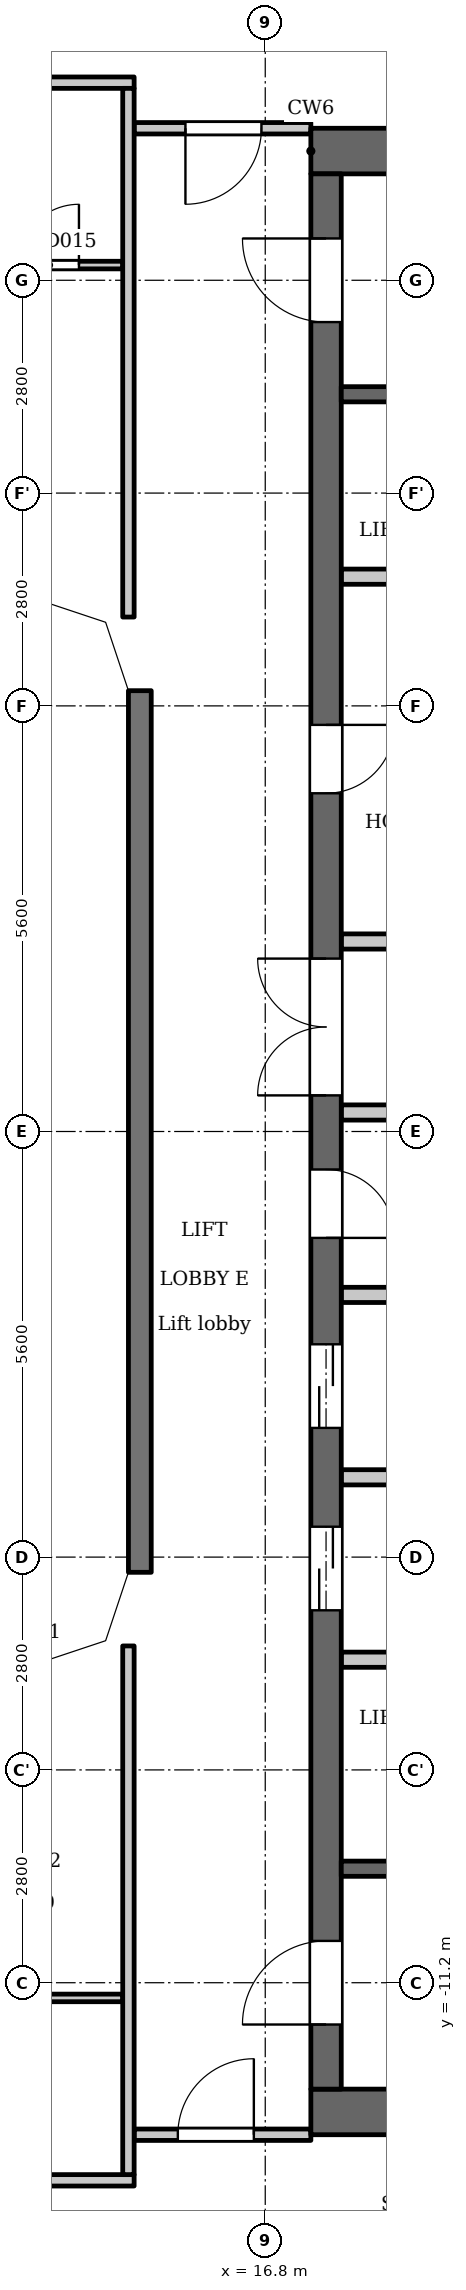
"""IFC4 building model, lengths in metres.
Left out: names, types, materials, properties, quantities, classifications, styles, units other than length and angle.
Written with IfcOpenShell. Run it as: python <this file> out.ifc"""

import sys

from ifc_helpers import new_model, si_unit, direction, frame, frame_2d, origin, place, context, subcontext, project, spatial, polyline, rectangle, outline, extrude, element, fill, save


model = new_model("IFC4")
c1 = context("Model", 3, precision=1e-05, world=origin(), true_north=direction((0.0, 1.0)))
c2 = subcontext(c1, "Body", "Model", "MODEL_VIEW")
j1 = project(units=[si_unit("LENGTHUNIT", "METRE"), si_unit("PLANEANGLEUNIT", "RADIAN")], contexts=[c1])
p1 = place(None, origin())
s1 = spatial("IfcSite", under=j1, at=p1, CompositionType="ELEMENT")
p2 = place(p1, origin())
s2 = spatial("IfcBuilding", under=s1, at=p2, CompositionType="ELEMENT")
p3 = place(p2, frame((0.0, 0.0, 273.2)))
s3 = spatial("IfcBuildingStorey", under=s2, at=p3, CompositionType="ELEMENT", Elevation=273.2)
p4 = place(p3, frame((15.15, 5.8, 0.0), z_axis=(0.0, 0.0, 1.0), x_axis=(0.0, -1.0, 0.0)))
e1 = element("IfcWall", 1, at=p4, inside=s3, PredefinedType="SOLIDWALL", context=c2, shape_type="SweptSolid", body=[
    extrude(rectangle(XDim=11.6, YDim=0.3, at=frame_2d((5.8, 0.0))), origin(), (0.0, 0.0, 1.0), 3.2),
])
for number, where, z_axis, x_axis in (
    (2, (17.4, 12.9, 0.0), (0.0, 0.0, 1.0), (1.0, 0.0, 0.0)),
    (3, (17.4, -12.9, 0.0), (0.0, 0.0, 1.0), (1.0, 0.0, 0.0)),
):
    element("IfcWall", number, at=place(p3, frame(where, z_axis=z_axis, x_axis=x_axis)), inside=s3, PredefinedType="SHEAR", context=c2, shape_type="SweptSolid", body=[
        extrude(rectangle(XDim=7.32, YDim=0.6, at=frame_2d((3.66, 0.0))), origin(), (0.0, 0.0, 1.0), 3.2),
    ])
p5 = place(p3, frame((17.6, -12.6, 0.0), z_axis=(0.0, 0.0, 1.0), x_axis=(0.0, 1.0, 0.0)))
e4 = element("IfcWall", 4, at=p5, inside=s3, PredefinedType="SHEAR", context=c2, shape_type="SweptSolid", body=[
    extrude(rectangle(XDim=25.2, YDim=0.4, at=frame_2d((12.6, 0.0))), origin(), (0.0, 0.0, 1.0), 3.2),
])
p6 = place(p5, frame((6.3, 0.0, 0.0)))
e5 = element("IfcOpeningElement", 5, at=p6, cuts=e4, PredefinedType="OPENING", context=c2, shape_type="SweptSolid", body=[
    extrude(rectangle(XDim=1.1, YDim=2.1, at=frame_2d((0.55, 1.05))), frame((0.0, 0.21, 0.0), z_axis=(0.0, -1.0, 0.0), x_axis=(1.0, 0.0, 0.0)), (0.0, 0.0, 1.0), 0.42),
])
p7 = place(p5, frame((8.7, 0.0, 0.0)))
e6 = element("IfcOpeningElement", 6, at=p7, cuts=e4, PredefinedType="OPENING", context=c2, shape_type="SweptSolid", body=[
    extrude(rectangle(XDim=1.1, YDim=2.1, at=frame_2d((0.55, 1.05))), frame((0.0, 0.21, 0.0), z_axis=(0.0, -1.0, 0.0), x_axis=(1.0, 0.0, 0.0)), (0.0, 0.0, 1.0), 0.42),
])
p8 = place(p5, frame((11.2, 0.0, 0.0)))
e7 = element("IfcOpeningElement", 7, at=p8, cuts=e4, PredefinedType="OPENING", context=c2, shape_type="SweptSolid", body=[
    extrude(rectangle(XDim=0.9, YDim=2.1, at=frame_2d((0.45, 1.05))), frame((0.0, 0.21, 0.0), z_axis=(0.0, -1.0, 0.0), x_axis=(1.0, 0.0, 0.0)), (0.0, 0.0, 1.0), 0.42),
])
p9 = place(p5, frame((17.05, 0.0, 0.0)))
e8 = element("IfcOpeningElement", 8, at=p9, cuts=e4, PredefinedType="OPENING", context=c2, shape_type="SweptSolid", body=[
    extrude(rectangle(XDim=0.9, YDim=2.1, at=frame_2d((0.45, 1.05))), frame((0.0, 0.21, 0.0), z_axis=(0.0, -1.0, 0.0), x_axis=(1.0, 0.0, 0.0)), (0.0, 0.0, 1.0), 0.42),
])
p10 = place(p5, frame((23.25, 0.0, 0.0)))
e9 = element("IfcOpeningElement", 9, at=p10, cuts=e4, PredefinedType="OPENING", context=c2, shape_type="SweptSolid", body=[
    extrude(rectangle(XDim=1.1, YDim=2.1, at=frame_2d((0.55, 1.05))), frame((0.0, 0.21, 0.0), z_axis=(0.0, -1.0, 0.0), x_axis=(1.0, 0.0, 0.0)), (0.0, 0.0, 1.0), 0.42),
])
p11 = place(p5, frame((0.85, 0.0, 0.0)))
e10 = element("IfcOpeningElement", 10, at=p11, cuts=e4, PredefinedType="OPENING", context=c2, shape_type="SweptSolid", body=[
    extrude(rectangle(XDim=1.1, YDim=2.1, at=frame_2d((0.55, 1.05))), frame((0.0, 0.21, 0.0), z_axis=(0.0, -1.0, 0.0), x_axis=(1.0, 0.0, 0.0)), (0.0, 0.0, 1.0), 0.42),
])
p12 = place(p5, frame((13.075, 0.0, 0.0)))
e11 = element("IfcOpeningElement", 11, at=p12, cuts=e4, PredefinedType="OPENING", context=c2, shape_type="SweptSolid", body=[
    extrude(rectangle(XDim=1.8, YDim=2.1, at=frame_2d((0.9, 1.05))), frame((0.0, 0.21, 0.0), z_axis=(0.0, -1.0, 0.0), x_axis=(1.0, 0.0, 0.0)), (0.0, 0.0, 1.0), 0.42),
])
p13 = place(p3, frame((17.8, -9.7, 0.0), z_axis=(0.0, 0.0, 1.0), x_axis=(1.0, 0.0, 0.0)))
e12 = element("IfcWall", 12, at=p13, inside=s3, PredefinedType="SHEAR", context=c2, shape_type="SweptSolid", body=[
    extrude(rectangle(XDim=5.8, YDim=0.2, at=frame_2d((2.9, 0.0))), origin(), (0.0, 0.0, 1.0), 3.2),
])
p14 = place(p13, frame((0.85, 0.0, 0.0)))
e13 = element("IfcOpeningElement", 13, at=p14, cuts=e12, PredefinedType="OPENING", context=c2, shape_type="SweptSolid", body=[
    extrude(rectangle(XDim=1.1, YDim=2.1, at=frame_2d((0.55, 1.05))), frame((0.0, 0.11, 0.0), z_axis=(0.0, -1.0, 0.0), x_axis=(1.0, 0.0, 0.0)), (0.0, 0.0, 1.0), 0.22),
])
p15 = place(p13, frame((3.75, 0.0, 0.0)))
e14 = element("IfcOpeningElement", 14, at=p15, cuts=e12, PredefinedType="OPENING", context=c2, shape_type="SweptSolid", body=[
    extrude(rectangle(XDim=1.1, YDim=2.1, at=frame_2d((0.55, 1.05))), frame((0.0, 0.11, 0.0), z_axis=(0.0, -1.0, 0.0), x_axis=(1.0, 0.0, 0.0)), (0.0, 0.0, 1.0), 0.22),
])
for number, where, z_axis, x_axis in (
    (15, (17.8, -6.95, 0.0), (0.0, 0.0, 1.0), (1.0, 0.0, 0.0)),
    (16, (17.8, -4.55, 0.0), (0.0, 0.0, 1.0), (1.0, 0.0, 0.0)),
    (17, (17.8, -2.15, 0.0), (0.0, 0.0, 1.0), (1.0, 0.0, 0.0)),
):
    element("IfcWall", number, at=place(p3, frame(where, z_axis=z_axis, x_axis=x_axis)), inside=s3, PredefinedType="PARTITIONING", context=c2, shape_type="SweptSolid", body=[
        extrude(rectangle(XDim=2.8, YDim=0.2, at=frame_2d((1.4, 0.0))), origin(), (0.0, 0.0, 1.0), 3.2),
    ])
for number, where, z_axis, x_axis in (
    (18, (17.8, 0.25, 0.0), (0.0, 0.0, 1.0), (1.0, 0.0, 0.0)),
    (19, (17.8, 2.5, 0.0), (0.0, 0.0, 1.0), (1.0, 0.0, 0.0)),
):
    element("IfcWall", number, at=place(p3, frame(where, z_axis=z_axis, x_axis=x_axis)), inside=s3, PredefinedType="PARTITIONING", context=c2, shape_type="SweptSolid", body=[
        extrude(rectangle(XDim=3.0, YDim=0.2, at=frame_2d((1.5, 0.0))), origin(), (0.0, 0.0, 1.0), 3.2),
    ])
p16 = place(p3, frame((17.8, 7.3, 0.0), z_axis=(0.0, 0.0, 1.0), x_axis=(1.0, 0.0, 0.0)))
e20 = element("IfcWall", 20, at=p16, inside=s3, PredefinedType="PARTITIONING", context=c2, shape_type="SweptSolid", body=[
    extrude(rectangle(XDim=2.8, YDim=0.2, at=frame_2d((1.4, 0.0))), origin(), (0.0, 0.0, 1.0), 3.2),
])
p17 = place(p3, frame((17.8, 9.7, 0.0), z_axis=(0.0, 0.0, 1.0), x_axis=(1.0, 0.0, 0.0)))
e21 = element("IfcWall", 21, at=p17, inside=s3, PredefinedType="SHEAR", context=c2, shape_type="SweptSolid", body=[
    extrude(rectangle(XDim=5.8, YDim=0.2, at=frame_2d((2.9, 0.0))), origin(), (0.0, 0.0, 1.0), 3.2),
])
p18 = place(p17, frame((0.85, 0.0, 0.0)))
e22 = element("IfcOpeningElement", 22, at=p18, cuts=e21, PredefinedType="OPENING", context=c2, shape_type="SweptSolid", body=[
    extrude(rectangle(XDim=1.1, YDim=2.1, at=frame_2d((0.55, 1.05))), frame((0.0, 0.11, 0.0), z_axis=(0.0, -1.0, 0.0), x_axis=(1.0, 0.0, 0.0)), (0.0, 0.0, 1.0), 0.22),
])
p19 = place(p17, frame((3.75, 0.0, 0.0)))
e23 = element("IfcOpeningElement", 23, at=p19, cuts=e21, PredefinedType="OPENING", context=c2, shape_type="SweptSolid", body=[
    extrude(rectangle(XDim=1.1, YDim=2.1, at=frame_2d((0.55, 1.05))), frame((0.0, 0.11, 0.0), z_axis=(0.0, -1.0, 0.0), x_axis=(1.0, 0.0, 0.0)), (0.0, 0.0, 1.0), 0.22),
])
p20 = place(p3, frame((-15.075, -13.8, 0.0), z_axis=(0.0, 0.0, 1.0), x_axis=(1.0, 0.0, 0.0)))
e24 = element("IfcWall", 24, at=p20, inside=s3, PredefinedType="PARTITIONING", context=c2, shape_type="SweptSolid", body=[
    extrude(rectangle(XDim=30.15, YDim=0.15, at=frame_2d((15.075, 0.0))), origin(), (0.0, 0.0, 1.0), 3.2),
])
p21 = place(p20, frame((10.175, 0.0, 0.0)))
e25 = element("IfcOpeningElement", 25, at=p21, cuts=e24, PredefinedType="OPENING", context=c2, shape_type="SweptSolid", body=[
    extrude(rectangle(XDim=1.0, YDim=2.1, at=frame_2d((0.5, 1.05))), frame((0.0, 0.085, 0.0), z_axis=(0.0, -1.0, 0.0), x_axis=(1.0, 0.0, 0.0)), (0.0, 0.0, 1.0), 0.17),
])
p22 = place(p20, frame((15.775, 0.0, 0.0)))
e26 = element("IfcOpeningElement", 26, at=p22, cuts=e24, PredefinedType="OPENING", context=c2, shape_type="SweptSolid", body=[
    extrude(rectangle(XDim=1.0, YDim=2.1, at=frame_2d((0.5, 1.05))), frame((0.0, 0.085, 0.0), z_axis=(0.0, -1.0, 0.0), x_axis=(1.0, 0.0, 0.0)), (0.0, 0.0, 1.0), 0.17),
])
p23 = place(p3, frame((15.075, -13.2, 0.0), z_axis=(0.0, 0.0, 1.0), x_axis=(1.0, 0.0, 0.0)))
e27 = element("IfcWall", 27, at=p23, inside=s3, PredefinedType="PARTITIONING", context=c2, shape_type="SweptSolid", body=[
    extrude(rectangle(XDim=2.325, YDim=0.15, at=frame_2d((1.163, 0.0))), origin(), (0.0, 0.0, 1.0), 3.2),
])
p24 = place(p23, frame((0.575, 0.0, 0.0)))
e28 = element("IfcOpeningElement", 28, at=p24, cuts=e27, PredefinedType="OPENING", context=c2, shape_type="SweptSolid", body=[
    extrude(rectangle(XDim=1.0, YDim=2.1, at=frame_2d((0.5, 1.05))), frame((0.0, 0.085, 0.0), z_axis=(0.0, -1.0, 0.0), x_axis=(1.0, 0.0, 0.0)), (0.0, 0.0, 1.0), 0.17),
])
p25 = place(p3, frame((-14.925, -11.4, 0.0), z_axis=(0.0, 0.0, 1.0), x_axis=(1.0, 0.0, 0.0)))
e29 = element("IfcWall", 29, at=p25, inside=s3, PredefinedType="PARTITIONING", context=c2, shape_type="SweptSolid", body=[
    extrude(rectangle(XDim=29.85, YDim=0.1, at=frame_2d((14.925, 0.0))), origin(), (0.0, 0.0, 1.0), 3.2),
])
p26 = place(p25, frame((13.375, 0.0, 0.0)))
e30 = element("IfcOpeningElement", 30, at=p26, cuts=e29, PredefinedType="OPENING", context=c2, shape_type="SweptSolid", body=[
    extrude(rectangle(XDim=0.9, YDim=2.1, at=frame_2d((0.45, 1.05))), frame((0.0, 0.06, 0.0), z_axis=(0.0, -1.0, 0.0), x_axis=(1.0, 0.0, 0.0)), (0.0, 0.0, 1.0), 0.12),
])
p27 = place(p25, frame((4.775, 0.0, 0.0)))
e31 = element("IfcOpeningElement", 31, at=p27, cuts=e29, PredefinedType="OPENING", context=c2, shape_type="SweptSolid", body=[
    extrude(rectangle(XDim=0.9, YDim=2.1, at=frame_2d((0.45, 1.05))), frame((0.0, 0.06, 0.0), z_axis=(0.0, -1.0, 0.0), x_axis=(1.0, 0.0, 0.0)), (0.0, 0.0, 1.0), 0.12),
])
p28 = place(p25, frame((18.475, 0.0, 0.0)))
e32 = element("IfcOpeningElement", 32, at=p28, cuts=e29, PredefinedType="OPENING", context=c2, shape_type="SweptSolid", body=[
    extrude(rectangle(XDim=0.9, YDim=2.1, at=frame_2d((0.45, 1.05))), frame((0.0, 0.06, 0.0), z_axis=(0.0, -1.0, 0.0), x_axis=(1.0, 0.0, 0.0)), (0.0, 0.0, 1.0), 0.12),
])
p29 = place(p25, frame((21.825, 0.0, 0.0)))
e33 = element("IfcOpeningElement", 33, at=p29, cuts=e29, PredefinedType="OPENING", context=c2, shape_type="SweptSolid", body=[
    extrude(rectangle(XDim=0.9, YDim=2.1, at=frame_2d((0.45, 1.05))), frame((0.0, 0.06, 0.0), z_axis=(0.0, -1.0, 0.0), x_axis=(1.0, 0.0, 0.0)), (0.0, 0.0, 1.0), 0.12),
])
p30 = place(p3, frame((-14.925, 11.4, 0.0), z_axis=(0.0, 0.0, 1.0), x_axis=(1.0, 0.0, 0.0)))
e34 = element("IfcWall", 34, at=p30, inside=s3, PredefinedType="PARTITIONING", context=c2, shape_type="SweptSolid", body=[
    extrude(rectangle(XDim=29.85, YDim=0.1, at=frame_2d((14.925, 0.0))), origin(), (0.0, 0.0, 1.0), 3.2),
])
p31 = place(p30, frame((13.475, 0.0, 0.0)))
e35 = element("IfcOpeningElement", 35, at=p31, cuts=e34, PredefinedType="OPENING", context=c2, shape_type="SweptSolid", body=[
    extrude(rectangle(XDim=0.9, YDim=2.1, at=frame_2d((0.45, 1.05))), frame((0.0, 0.06, 0.0), z_axis=(0.0, -1.0, 0.0), x_axis=(1.0, 0.0, 0.0)), (0.0, 0.0, 1.0), 0.12),
])
p32 = place(p30, frame((4.625, 0.0, 0.0)))
e36 = element("IfcOpeningElement", 36, at=p32, cuts=e34, PredefinedType="OPENING", context=c2, shape_type="SweptSolid", body=[
    extrude(rectangle(XDim=0.9, YDim=2.1, at=frame_2d((0.45, 1.05))), frame((0.0, 0.06, 0.0), z_axis=(0.0, -1.0, 0.0), x_axis=(1.0, 0.0, 0.0)), (0.0, 0.0, 1.0), 0.12),
])
p33 = place(p30, frame((18.075, 0.0, 0.0)))
e37 = element("IfcOpeningElement", 37, at=p33, cuts=e34, PredefinedType="OPENING", context=c2, shape_type="SweptSolid", body=[
    extrude(rectangle(XDim=0.8, YDim=2.1, at=frame_2d((0.4, 1.05))), frame((0.0, 0.06, 0.0), z_axis=(0.0, -1.0, 0.0), x_axis=(1.0, 0.0, 0.0)), (0.0, 0.0, 1.0), 0.12),
])
p34 = place(p30, frame((15.575, 0.0, 0.0)))
e38 = element("IfcOpeningElement", 38, at=p34, cuts=e34, PredefinedType="OPENING", context=c2, shape_type="SweptSolid", body=[
    extrude(rectangle(XDim=0.9, YDim=2.1, at=frame_2d((0.45, 1.05))), frame((0.0, 0.06, 0.0), z_axis=(0.0, -1.0, 0.0), x_axis=(1.0, 0.0, 0.0)), (0.0, 0.0, 1.0), 0.12),
])
p35 = place(p30, frame((28.474, 0.0, 0.0)))
e39 = element("IfcOpeningElement", 39, at=p35, cuts=e34, PredefinedType="OPENING", context=c2, shape_type="SweptSolid", body=[
    extrude(rectangle(XDim=0.8, YDim=2.1, at=frame_2d((0.4, 1.05))), frame((0.0, 0.06, 0.0), z_axis=(0.0, -1.0, 0.0), x_axis=(1.0, 0.0, 0.0)), (0.0, 0.0, 1.0), 0.12),
])
p36 = place(p30, frame((23.425, 0.0, 0.0)))
e40 = element("IfcOpeningElement", 40, at=p36, cuts=e34, PredefinedType="OPENING", context=c2, shape_type="SweptSolid", body=[
    extrude(rectangle(XDim=0.9, YDim=2.1, at=frame_2d((0.45, 1.05))), frame((0.0, 0.06, 0.0), z_axis=(0.0, -1.0, 0.0), x_axis=(1.0, 0.0, 0.0)), (0.0, 0.0, 1.0), 0.12),
])
p37 = place(p3, frame((15.075, 13.2, 0.0), z_axis=(0.0, 0.0, 1.0), x_axis=(1.0, 0.0, 0.0)))
e41 = element("IfcWall", 41, at=p37, inside=s3, PredefinedType="PARTITIONING", context=c2, shape_type="SweptSolid", body=[
    extrude(rectangle(XDim=2.325, YDim=0.15, at=frame_2d((1.163, 0.0))), origin(), (0.0, 0.0, 1.0), 3.2),
])
p38 = place(p37, frame((0.675, 0.0, 0.0)))
e42 = element("IfcOpeningElement", 42, at=p38, cuts=e41, PredefinedType="OPENING", context=c2, shape_type="SweptSolid", body=[
    extrude(rectangle(XDim=1.0, YDim=2.1, at=frame_2d((0.5, 1.05))), frame((0.0, 0.085, 0.0), z_axis=(0.0, -1.0, 0.0), x_axis=(1.0, 0.0, 0.0)), (0.0, 0.0, 1.0), 0.17),
])
p39 = place(p3, frame((-15.075, 13.8, 0.0), z_axis=(0.0, 0.0, 1.0), x_axis=(1.0, 0.0, 0.0)))
e43 = element("IfcWall", 43, at=p39, inside=s3, PredefinedType="PARTITIONING", context=c2, shape_type="SweptSolid", body=[
    extrude(rectangle(XDim=30.15, YDim=0.15, at=frame_2d((15.075, 0.0))), origin(), (0.0, 0.0, 1.0), 3.2),
])
p40 = place(p39, frame((10.125, 0.0, 0.0)))
e44 = element("IfcOpeningElement", 44, at=p40, cuts=e43, PredefinedType="OPENING", context=c2, shape_type="SweptSolid", body=[
    extrude(rectangle(XDim=1.0, YDim=2.1, at=frame_2d((0.5, 1.05))), frame((0.0, 0.085, 0.0), z_axis=(0.0, -1.0, 0.0), x_axis=(1.0, 0.0, 0.0)), (0.0, 0.0, 1.0), 0.17),
])
p41 = place(p39, frame((15.725, 0.0, 0.0)))
e45 = element("IfcOpeningElement", 45, at=p41, cuts=e43, PredefinedType="OPENING", context=c2, shape_type="SweptSolid", body=[
    extrude(rectangle(XDim=1.0, YDim=2.1, at=frame_2d((0.5, 1.05))), frame((0.0, 0.085, 0.0), z_axis=(0.0, -1.0, 0.0), x_axis=(1.0, 0.0, 0.0)), (0.0, 0.0, 1.0), 0.17),
])
p42 = place(p39, frame((24.575, 0.0, 0.0)))
e46 = element("IfcOpeningElement", 46, at=p42, cuts=e43, PredefinedType="OPENING", context=c2, shape_type="SweptSolid", body=[
    extrude(rectangle(XDim=1.0, YDim=2.1, at=frame_2d((0.5, 1.05))), frame((0.0, 0.085, 0.0), z_axis=(0.0, -1.0, 0.0), x_axis=(1.0, 0.0, 0.0)), (0.0, 0.0, 1.0), 0.17),
])
for number, where, z_axis, x_axis in (
    (47, (15.0, -13.725, 0.0), (0.0, 0.0, 1.0), (0.0, 1.0, 0.0)),
    (48, (15.0, 6.769, 0.0), (0.0, 0.0, 1.0), (0.0, 1.0, 0.0)),
):
    element("IfcWall", number, at=place(p3, frame(where, z_axis=z_axis, x_axis=x_axis)), inside=s3, PredefinedType="PARTITIONING", context=c2, shape_type="SweptSolid", body=[
        extrude(rectangle(XDim=6.956, YDim=0.15, at=frame_2d((3.478, 0.0))), origin(), (0.0, 0.0, 1.0), 3.2),
    ])
p43 = place(p3, origin())
e49 = element("IfcWall", 49, at=p43, inside=s3, PredefinedType="SOLIDWALL", context=c2, shape_type="SweptSolid", body=[
    extrude(outline(polyline([(14.937, 6.937), (13.849, 7.3), (13.8, 7.3), (13.8, 7.0), (14.7, 6.7), (15.0, 5.8), (15.3, 5.8), (15.3, 5.849), (14.937, 6.937)])), origin(), (0.0, 0.0, 1.0), 3.2),
])
e50 = element("IfcWall", 50, at=p43, inside=s3, PredefinedType="SOLIDWALL", context=c2, shape_type="SweptSolid", body=[
    extrude(outline(polyline([(14.937, -6.937), (15.3, -5.849), (15.3, -5.8), (15.0, -5.8), (14.7, -6.7), (13.8, -7.0), (13.8, -7.3), (13.849, -7.3), (14.937, -6.937)])), origin(), (0.0, 0.0, 1.0), 3.2),
])
p44 = place(p6, origin())
e51 = element("IfcDoor", 51, at=p44, inside=s3, OperationType="DOUBLE_DOOR_SLIDING", PredefinedType="DOOR", context=c2, shape_type="SweptSolid", body=[
    extrude(rectangle(XDim=1.1, YDim=2.1, at=frame_2d((0.55, 1.05))), frame((0.0, 0.025, 0.0), z_axis=(0.0, -1.0, 0.0), x_axis=(1.0, 0.0, 0.0)), (0.0, 0.0, 1.0), 0.05),
])
fill(e5, e51)
p45 = place(p7, origin())
e52 = element("IfcDoor", 52, at=p45, inside=s3, OperationType="DOUBLE_DOOR_SLIDING", PredefinedType="DOOR", context=c2, shape_type="SweptSolid", body=[
    extrude(rectangle(XDim=1.1, YDim=2.1, at=frame_2d((0.55, 1.05))), frame((0.0, 0.025, 0.0), z_axis=(0.0, -1.0, 0.0), x_axis=(1.0, 0.0, 0.0)), (0.0, 0.0, 1.0), 0.05),
])
fill(e6, e52)
p46 = place(p8, origin())
e53 = element("IfcDoor", 53, at=p46, inside=s3, OperationType="SINGLE_SWING_LEFT", PredefinedType="DOOR", context=c2, shape_type="SweptSolid", body=[
    extrude(rectangle(XDim=0.9, YDim=2.1, at=frame_2d((0.45, 1.05))), frame((0.0, 0.025, 0.0), z_axis=(0.0, -1.0, 0.0), x_axis=(1.0, 0.0, 0.0)), (0.0, 0.0, 1.0), 0.05),
])
fill(e7, e53)
p47 = place(p9, origin())
e54 = element("IfcDoor", 54, at=p47, inside=s3, OperationType="SINGLE_SWING_RIGHT", PredefinedType="DOOR", context=c2, shape_type="SweptSolid", body=[
    extrude(rectangle(XDim=0.9, YDim=2.1, at=frame_2d((0.45, 1.05))), frame((0.0, 0.025, 0.0), z_axis=(0.0, -1.0, 0.0), x_axis=(1.0, 0.0, 0.0)), (0.0, 0.0, 1.0), 0.05),
])
fill(e8, e54)
p48 = place(p10, origin())
e55 = element("IfcDoor", 55, at=p48, inside=s3, OperationType="SINGLE_SWING_LEFT", PredefinedType="DOOR", context=c2, shape_type="SweptSolid", body=[
    extrude(rectangle(XDim=1.1, YDim=2.1, at=frame_2d((0.55, 1.05))), frame((0.0, 0.025, 0.0), z_axis=(0.0, -1.0, 0.0), x_axis=(1.0, 0.0, 0.0)), (0.0, 0.0, 1.0), 0.05),
])
fill(e9, e55)
p49 = place(p11, origin())
e56 = element("IfcDoor", 56, at=p49, inside=s3, OperationType="SINGLE_SWING_RIGHT", PredefinedType="DOOR", context=c2, shape_type="SweptSolid", body=[
    extrude(rectangle(XDim=1.1, YDim=2.1, at=frame_2d((0.55, 1.05))), frame((0.0, 0.025, 0.0), z_axis=(0.0, -1.0, 0.0), x_axis=(1.0, 0.0, 0.0)), (0.0, 0.0, 1.0), 0.05),
])
fill(e10, e56)
p50 = place(p12, origin())
e57 = element("IfcDoor", 57, at=p50, inside=s3, OperationType="DOUBLE_DOOR_SINGLE_SWING", PredefinedType="DOOR", context=c2, shape_type="SweptSolid", body=[
    extrude(rectangle(XDim=1.8, YDim=2.1, at=frame_2d((0.9, 1.05))), frame((0.0, 0.025, 0.0), z_axis=(0.0, -1.0, 0.0), x_axis=(1.0, 0.0, 0.0)), (0.0, 0.0, 1.0), 0.05),
])
fill(e11, e57)
p51 = place(p38, origin())
e58 = element("IfcDoor", 58, at=p51, inside=s3, OperationType="SINGLE_SWING_LEFT", PredefinedType="DOOR", context=c2, shape_type="SweptSolid", body=[
    extrude(rectangle(XDim=1.0, YDim=2.1, at=frame_2d((0.5, 1.05))), frame((0.0, 0.025, 0.0), z_axis=(0.0, -1.0, 0.0), x_axis=(1.0, 0.0, 0.0)), (0.0, 0.0, 1.0), 0.05),
])
fill(e42, e58)
p52 = place(p24, origin())
e59 = element("IfcDoor", 59, at=p52, inside=s3, OperationType="SINGLE_SWING_LEFT", PredefinedType="DOOR", context=c2, shape_type="SweptSolid", body=[
    extrude(rectangle(XDim=1.0, YDim=2.1, at=frame_2d((0.5, 1.05))), frame((0.0, 0.025, 0.0), z_axis=(0.0, -1.0, 0.0), x_axis=(1.0, 0.0, 0.0)), (0.0, 0.0, 1.0), 0.05),
])
fill(e28, e59)
p53 = place(p35, origin())
e60 = element("IfcDoor", 60, at=p53, inside=s3, OperationType="SINGLE_SWING_LEFT", PredefinedType="DOOR", context=c2, shape_type="SweptSolid", body=[
    extrude(rectangle(XDim=0.8, YDim=2.1, at=frame_2d((0.4, 1.05))), frame((0.0, 0.025, 0.0), z_axis=(0.0, -1.0, 0.0), x_axis=(1.0, 0.0, 0.0)), (0.0, 0.0, 1.0), 0.05),
])
fill(e39, e60)
save(model, sys.argv[1])
